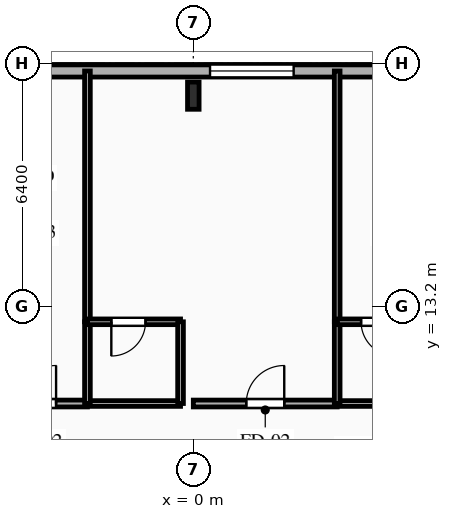
"""IFC4 building model, lengths in metres.
Left out: names, types, materials, properties, quantities, classifications, styles, units other than length and angle.
Written with IfcOpenShell. Run it as: python <this file> out.ifc"""

import sys

from ifc_helpers import new_model, si_unit, direction, frame, frame_2d, origin, origin_2d, place, context, subcontext, project, spatial, rectangle, i_section, extrude, element, fill, save


model = new_model("IFC4")
c1 = context("Model", 3, precision=1e-05, world=origin(), true_north=direction((0.0, 1.0)))
c2 = subcontext(c1, "Body", "Model", "MODEL_VIEW")
j1 = project(units=[si_unit("LENGTHUNIT", "METRE"), si_unit("PLANEANGLEUNIT", "RADIAN")], contexts=[c1])
p1 = place(None, origin())
s1 = spatial("IfcSite", under=j1, at=p1, CompositionType="ELEMENT")
p2 = place(p1, origin())
s2 = spatial("IfcBuilding", under=s1, at=p2, CompositionType="ELEMENT")
p3 = place(p2, frame((0.0, 0.0, 33.7)))
s3 = spatial("IfcBuildingStorey", under=s2, at=p3, CompositionType="ELEMENT", Elevation=33.7)
p4 = place(p3, frame((0.0, 18.75, 0.0), z_axis=(0.0, 0.0, 1.0), x_axis=(1.0, 0.0, 0.0)))
e1 = element("IfcColumn", 1, at=p4, inside=s3, PredefinedType="COLUMN", context=c2, shape_type="SweptSolid", body=[
    extrude(i_section(OverallWidth=0.304, OverallDepth=0.716, WebThickness=0.021, FlangeThickness=0.04, FilletRadius=0.027, at=origin_2d()), origin(), (0.0, 0.0, 1.0), 3.35),
])
p5 = place(p3, frame((-29.2, 19.4, 0.0), z_axis=(0.0, 0.0, 1.0), x_axis=(1.0, 0.0, 0.0)))
e2 = element("IfcWall", 2, at=p5, inside=s3, PredefinedType="SOLIDWALL", context=c2, shape_type="SweptSolid", body=[
    extrude(rectangle(XDim=58.4, YDim=0.32, at=frame_2d((29.2, 0.0))), origin(), (0.0, 0.0, 1.0), 3.035),
])
p6 = place(p5, frame((8.261, 0.0, 0.85)))
e3 = element("IfcOpeningElement", 3, at=p6, cuts=e2, PredefinedType="OPENING", context=c2, shape_type="SweptSolid", body=[
    extrude(rectangle(XDim=1.65, YDim=1.85, at=frame_2d((0.825, 0.925))), frame((0.0, 0.17, 0.0), z_axis=(0.0, -1.0, 0.0), x_axis=(1.0, 0.0, 0.0)), (0.0, 0.0, 1.0), 0.34),
])
p7 = place(p5, frame((17.05, 0.0, 0.85)))
e4 = element("IfcOpeningElement", 4, at=p7, cuts=e2, PredefinedType="OPENING", context=c2, shape_type="SweptSolid", body=[
    extrude(rectangle(XDim=1.5, YDim=1.85, at=frame_2d((0.75, 0.925))), frame((0.0, 0.17, 0.0), z_axis=(0.0, -1.0, 0.0), x_axis=(1.0, 0.0, 0.0)), (0.0, 0.0, 1.0), 0.34),
])
p8 = place(p5, frame((22.1, 0.0, 0.85)))
e5 = element("IfcOpeningElement", 5, at=p8, cuts=e2, PredefinedType="OPENING", context=c2, shape_type="SweptSolid", body=[
    extrude(rectangle(XDim=2.2, YDim=1.85, at=frame_2d((1.1, 0.925))), frame((0.0, 0.17, 0.0), z_axis=(0.0, -1.0, 0.0), x_axis=(1.0, 0.0, 0.0)), (0.0, 0.0, 1.0), 0.34),
])
p9 = place(p5, frame((29.64, 0.0, 0.85)))
e6 = element("IfcOpeningElement", 6, at=p9, cuts=e2, PredefinedType="OPENING", context=c2, shape_type="SweptSolid", body=[
    extrude(rectangle(XDim=2.2, YDim=1.85, at=frame_2d((1.1, 0.925))), frame((0.0, 0.17, 0.0), z_axis=(0.0, -1.0, 0.0), x_axis=(1.0, 0.0, 0.0)), (0.0, 0.0, 1.0), 0.34),
])
p10 = place(p5, frame((35.22, 0.0, 0.85)))
e7 = element("IfcOpeningElement", 7, at=p10, cuts=e2, PredefinedType="OPENING", context=c2, shape_type="SweptSolid", body=[
    extrude(rectangle(XDim=2.2, YDim=1.85, at=frame_2d((1.1, 0.925))), frame((0.0, 0.17, 0.0), z_axis=(0.0, -1.0, 0.0), x_axis=(1.0, 0.0, 0.0)), (0.0, 0.0, 1.0), 0.34),
])
p11 = place(p5, frame((41.78, 0.0, 0.85)))
e8 = element("IfcOpeningElement", 8, at=p11, cuts=e2, PredefinedType="OPENING", context=c2, shape_type="SweptSolid", body=[
    extrude(rectangle(XDim=2.2, YDim=1.85, at=frame_2d((1.1, 0.925))), frame((0.0, 0.17, 0.0), z_axis=(0.0, -1.0, 0.0), x_axis=(1.0, 0.0, 0.0)), (0.0, 0.0, 1.0), 0.34),
])
p12 = place(p5, frame((48.905, 0.0, 0.85)))
e9 = element("IfcOpeningElement", 9, at=p12, cuts=e2, PredefinedType="OPENING", context=c2, shape_type="SweptSolid", body=[
    extrude(rectangle(XDim=1.65, YDim=1.85, at=frame_2d((0.825, 0.925))), frame((0.0, 0.17, 0.0), z_axis=(0.0, -1.0, 0.0), x_axis=(1.0, 0.0, 0.0)), (0.0, 0.0, 1.0), 0.34),
])
p13 = place(p3, frame((-6.907, 10.65, 0.0), z_axis=(0.0, 0.0, 1.0), x_axis=(1.0, 0.0, 0.0)))
e10 = element("IfcWall", 10, at=p13, inside=s3, PredefinedType="PARTITIONING", context=c2, shape_type="SweptSolid", body=[
    extrude(rectangle(XDim=4.121, YDim=0.18, at=frame_2d((2.061, 0.0))), origin(), (0.0, 0.0, 1.0), 3.035),
])
p14 = place(p13, frame((2.296, 0.0, 0.0)))
e11 = element("IfcOpeningElement", 11, at=p14, cuts=e10, PredefinedType="OPENING", context=c2, shape_type="SweptSolid", body=[
    extrude(rectangle(XDim=1.0, YDim=2.15, at=frame_2d((0.5, 1.075))), frame((0.0, 0.1, 0.0), z_axis=(0.0, -1.0, 0.0), x_axis=(1.0, 0.0, 0.0)), (0.0, 0.0, 1.0), 0.2),
])
p15 = place(p3, frame((-2.786, 10.65, 0.0), z_axis=(0.0, 0.0, 1.0), x_axis=(1.0, 0.0, 0.0)))
e12 = element("IfcWall", 12, at=p15, inside=s3, PredefinedType="PLUMBINGWALL", context=c2, shape_type="SweptSolid", body=[
    extrude(rectangle(XDim=2.45, YDim=0.15, at=frame_2d((1.225, 0.0))), origin(), (0.0, 0.0, 1.0), 3.035),
])
p16 = place(p3, frame((0.0, 10.65, 0.0), z_axis=(0.0, 0.0, 1.0), x_axis=(1.0, 0.0, 0.0)))
e13 = element("IfcWall", 13, at=p16, inside=s3, PredefinedType="PARTITIONING", context=c2, shape_type="SweptSolid", body=[
    extrude(rectangle(XDim=3.786, YDim=0.18, at=frame_2d((1.893, 0.0))), origin(), (0.0, 0.0, 1.0), 3.035),
])
p17 = place(p16, frame((1.393, 0.0, 0.0)))
e14 = element("IfcOpeningElement", 14, at=p17, cuts=e13, PredefinedType="OPENING", context=c2, shape_type="SweptSolid", body=[
    extrude(rectangle(XDim=1.0, YDim=2.15, at=frame_2d((0.5, 1.075))), frame((0.0, 0.1, 0.0), z_axis=(0.0, -1.0, 0.0), x_axis=(1.0, 0.0, 0.0)), (0.0, 0.0, 1.0), 0.2),
])
p18 = place(p3, frame((3.786, 10.65, 0.0), z_axis=(0.0, 0.0, 1.0), x_axis=(1.0, 0.0, 0.0)))
e15 = element("IfcWall", 15, at=p18, inside=s3, PredefinedType="PLUMBINGWALL", context=c2, shape_type="SweptSolid", body=[
    extrude(rectangle(XDim=2.45, YDim=0.15, at=frame_2d((1.225, 0.0))), origin(), (0.0, 0.0, 1.0), 3.035),
])
p19 = place(p3, frame((-2.786, 19.4, 0.0), z_axis=(0.0, 0.0, 1.0), x_axis=(0.0, -1.0, 0.0)))
e16 = element("IfcWall", 16, at=p19, inside=s3, PredefinedType="PARTITIONING", context=c2, shape_type="SweptSolid", body=[
    extrude(rectangle(XDim=6.6, YDim=0.15, at=frame_2d((3.3, 0.0))), origin(), (0.0, 0.0, 1.0), 3.035),
])
p20 = place(p3, frame((-2.786, 12.8, 0.0), z_axis=(0.0, 0.0, 1.0), x_axis=(0.0, -1.0, 0.0)))
e17 = element("IfcWall", 17, at=p20, inside=s3, PredefinedType="PLUMBINGWALL", context=c2, shape_type="SweptSolid", body=[
    extrude(rectangle(XDim=2.15, YDim=0.15, at=frame_2d((1.075, 0.0))), origin(), (0.0, 0.0, 1.0), 3.035),
])
p21 = place(p3, frame((-0.336, 12.8, 0.0), z_axis=(0.0, 0.0, 1.0), x_axis=(-1.0, 0.0, 0.0)))
e18 = element("IfcWall", 18, at=p21, inside=s3, PredefinedType="PLUMBINGWALL", context=c2, shape_type="SweptSolid", body=[
    extrude(rectangle(XDim=2.45, YDim=0.15, at=frame_2d((1.225, 0.0))), origin(), (0.0, 0.0, 1.0), 3.035),
])
p22 = place(p21, frame((0.921, 0.0, 0.0)))
e19 = element("IfcOpeningElement", 19, at=p22, cuts=e18, PredefinedType="OPENING", context=c2, shape_type="SweptSolid", body=[
    extrude(rectangle(XDim=0.9, YDim=2.1, at=frame_2d((0.45, 1.05))), frame((0.0, 0.085, 0.0), z_axis=(0.0, -1.0, 0.0), x_axis=(1.0, 0.0, 0.0)), (0.0, 0.0, 1.0), 0.17),
])
p23 = place(p3, frame((-0.336, 10.65, 0.0), z_axis=(0.0, 0.0, 1.0), x_axis=(0.0, 1.0, 0.0)))
e20 = element("IfcWall", 20, at=p23, inside=s3, PredefinedType="PLUMBINGWALL", context=c2, shape_type="SweptSolid", body=[
    extrude(rectangle(XDim=2.15, YDim=0.15, at=frame_2d((1.075, 0.0))), origin(), (0.0, 0.0, 1.0), 3.035),
])
p24 = place(p3, frame((3.786, 19.4, 0.0), z_axis=(0.0, 0.0, 1.0), x_axis=(0.0, -1.0, 0.0)))
e21 = element("IfcWall", 21, at=p24, inside=s3, PredefinedType="PARTITIONING", context=c2, shape_type="SweptSolid", body=[
    extrude(rectangle(XDim=6.6, YDim=0.15, at=frame_2d((3.3, 0.0))), origin(), (0.0, 0.0, 1.0), 3.035),
])
p25 = place(p3, frame((3.786, 12.8, 0.0), z_axis=(0.0, 0.0, 1.0), x_axis=(0.0, -1.0, 0.0)))
e22 = element("IfcWall", 22, at=p25, inside=s3, PredefinedType="PLUMBINGWALL", context=c2, shape_type="SweptSolid", body=[
    extrude(rectangle(XDim=2.15, YDim=0.15, at=frame_2d((1.075, 0.0))), origin(), (0.0, 0.0, 1.0), 3.035),
])
p26 = place(p3, frame((6.236, 12.8, 0.0), z_axis=(0.0, 0.0, 1.0), x_axis=(-1.0, 0.0, 0.0)))
e23 = element("IfcWall", 23, at=p26, inside=s3, PredefinedType="PLUMBINGWALL", context=c2, shape_type="SweptSolid", body=[
    extrude(rectangle(XDim=2.45, YDim=0.15, at=frame_2d((1.225, 0.0))), origin(), (0.0, 0.0, 1.0), 3.035),
])
p27 = place(p26, frame((0.921, 0.0, 0.0)))
e24 = element("IfcOpeningElement", 24, at=p27, cuts=e23, PredefinedType="OPENING", context=c2, shape_type="SweptSolid", body=[
    extrude(rectangle(XDim=0.9, YDim=2.1, at=frame_2d((0.45, 1.05))), frame((0.0, 0.085, 0.0), z_axis=(0.0, -1.0, 0.0), x_axis=(1.0, 0.0, 0.0)), (0.0, 0.0, 1.0), 0.17),
])
p28 = place(p9, origin())
e25 = element("IfcWindow", 25, at=p28, inside=s3, PartitioningType="SINGLE_PANEL", PredefinedType="WINDOW", context=c2, shape_type="SweptSolid", body=[
    extrude(rectangle(XDim=2.2, YDim=1.85, at=frame_2d((1.1, 0.925))), frame((0.0, 0.03, 0.0), z_axis=(0.0, -1.0, 0.0), x_axis=(1.0, 0.0, 0.0)), (0.0, 0.0, 1.0), 0.06),
])
fill(e6, e25)
p29 = place(p14, origin())
e26 = element("IfcDoor", 26, at=p29, inside=s3, OperationType="SINGLE_SWING_RIGHT", PredefinedType="DOOR", context=c2, shape_type="SweptSolid", body=[
    extrude(rectangle(XDim=1.0, YDim=2.15, at=frame_2d((0.5, 1.075))), frame((0.0, 0.025, 0.0), z_axis=(0.0, -1.0, 0.0), x_axis=(1.0, 0.0, 0.0)), (0.0, 0.0, 1.0), 0.05),
])
fill(e11, e26)
p30 = place(p17, origin())
e27 = element("IfcDoor", 27, at=p30, inside=s3, OperationType="SINGLE_SWING_RIGHT", PredefinedType="DOOR", context=c2, shape_type="SweptSolid", body=[
    extrude(rectangle(XDim=1.0, YDim=2.15, at=frame_2d((0.5, 1.075))), frame((0.0, 0.025, 0.0), z_axis=(0.0, -1.0, 0.0), x_axis=(1.0, 0.0, 0.0)), (0.0, 0.0, 1.0), 0.05),
])
fill(e14, e27)
p31 = place(p22, origin())
e28 = element("IfcDoor", 28, at=p31, inside=s3, OperationType="SINGLE_SWING_RIGHT", PredefinedType="DOOR", context=c2, shape_type="SweptSolid", body=[
    extrude(rectangle(XDim=0.9, YDim=2.1, at=frame_2d((0.45, 1.05))), frame((0.0, 0.025, 0.0), z_axis=(0.0, -1.0, 0.0), x_axis=(1.0, 0.0, 0.0)), (0.0, 0.0, 1.0), 0.05),
])
fill(e19, e28)
p32 = place(p27, origin())
e29 = element("IfcDoor", 29, at=p32, inside=s3, OperationType="SINGLE_SWING_LEFT", PredefinedType="DOOR", context=c2, shape_type="SweptSolid", body=[
    extrude(rectangle(XDim=0.9, YDim=2.1, at=frame_2d((0.45, 1.05))), frame((0.0, 0.025, 0.0), z_axis=(0.0, -1.0, 0.0), x_axis=(1.0, 0.0, 0.0)), (0.0, 0.0, 1.0), 0.05),
])
fill(e24, e29)
save(model, sys.argv[1])
